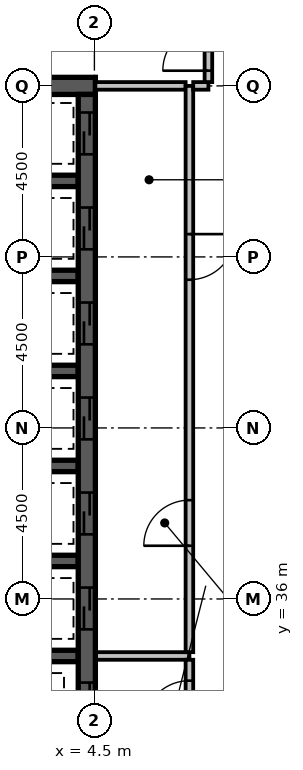
"""IFC4 building model, lengths in metres.
Left out: names, types, materials, properties, quantities, classifications, styles, units other than length and angle.
Written with IfcOpenShell. Run it as: python <this file> out.ifc"""

import sys

from ifc_helpers import new_model, si_unit, direction, frame, frame_2d, origin, place, context, subcontext, project, spatial, rectangle, extrude, element, fill, save


model = new_model("IFC4")
c1 = context("Model", 3, precision=1e-05, world=origin(), true_north=direction((0.0, 1.0)))
c2 = subcontext(c1, "Body", "Model", "MODEL_VIEW")
j1 = project(units=[si_unit("LENGTHUNIT", "METRE"), si_unit("PLANEANGLEUNIT", "RADIAN")], contexts=[c1])
p1 = place(None, origin())
s1 = spatial("IfcSite", under=j1, at=p1, CompositionType="ELEMENT")
p2 = place(p1, origin())
s2 = spatial("IfcBuilding", under=s1, at=p2, CompositionType="ELEMENT")
p3 = place(p2, frame((0.0, 0.0, 251.0)))
s3 = spatial("IfcBuildingStorey", under=s2, at=p3, CompositionType="ELEMENT", Elevation=251.0)
p4 = place(p3, frame((0.275, 49.5, -0.3), z_axis=(0.0, 0.0, 1.0), x_axis=(1.0, 0.0, 0.0)))
e1 = element("IfcWall", 1, at=p4, inside=s3, PredefinedType="SHEAR", context=c2, shape_type="SweptSolid", body=[
    extrude(rectangle(XDim=4.25, YDim=0.45, at=frame_2d((2.125, 0.0))), origin(), (0.0, 0.0, 1.0), 3.6),
])
for number, where, z_axis, x_axis in (
    (2, (0.725, 34.5, -0.3), (0.0, 0.0, 1.0), (1.0, 0.0, 0.0)),
    (3, (0.725, 37.0, -0.3), (0.0, 0.0, 1.0), (1.0, 0.0, 0.0)),
    (4, (0.725, 39.5, -0.3), (0.0, 0.0, 1.0), (1.0, 0.0, 0.0)),
    (5, (0.725, 42.0, -0.3), (0.0, 0.0, 1.0), (1.0, 0.0, 0.0)),
    (6, (0.725, 44.5, -0.3), (0.0, 0.0, 1.0), (1.0, 0.0, 0.0)),
    (7, (0.725, 47.0, -0.3), (0.0, 0.0, 1.0), (1.0, 0.0, 0.0)),
):
    element("IfcWall", number, at=place(p3, frame(where, z_axis=z_axis, x_axis=x_axis)), inside=s3, PredefinedType="SHEAR", context=c2, shape_type="SweptSolid", body=[
        extrude(rectangle(XDim=3.35, YDim=0.3, at=frame_2d((1.675, 0.0))), origin(), (0.0, 0.0, 1.0), 3.6),
    ])
p5 = place(p3, frame((4.3, 27.15, -0.3), z_axis=(0.0, 0.0, 1.0), x_axis=(0.0, 1.0, 0.0)))
e8 = element("IfcWall", 8, at=p5, inside=s3, PredefinedType="SHEAR", context=c2, shape_type="SweptSolid", body=[
    extrude(rectangle(XDim=22.125, YDim=0.45, at=frame_2d((11.062, 0.0))), origin(), (0.0, 0.0, 1.0), 3.6),
])
p6 = place(p5, frame((3.05, 0.0, 0.3)))
e9 = element("IfcOpeningElement", 9, at=p6, cuts=e8, PredefinedType="OPENING", context=c2, shape_type="SweptSolid", body=[
    extrude(rectangle(XDim=1.1, YDim=2.1, at=frame_2d((0.55, 1.05))), frame((0.0, 0.237, 0.0), z_axis=(0.0, -1.0, 0.0), x_axis=(1.0, 0.0, 0.0)), (0.0, 0.0, 1.0), 0.474),
])
p7 = place(p5, frame((0.55, 0.0, 0.3)))
e10 = element("IfcOpeningElement", 10, at=p7, cuts=e8, PredefinedType="OPENING", context=c2, shape_type="SweptSolid", body=[
    extrude(rectangle(XDim=1.1, YDim=2.1, at=frame_2d((0.55, 1.05))), frame((0.0, 0.237, 0.0), z_axis=(0.0, -1.0, 0.0), x_axis=(1.0, 0.0, 0.0)), (0.0, 0.0, 1.0), 0.474),
])
p8 = place(p5, frame((20.55, 0.0, 0.3)))
e11 = element("IfcOpeningElement", 11, at=p8, cuts=e8, PredefinedType="OPENING", context=c2, shape_type="SweptSolid", body=[
    extrude(rectangle(XDim=1.1, YDim=2.1, at=frame_2d((0.55, 1.05))), frame((0.0, 0.237, 0.0), z_axis=(0.0, -1.0, 0.0), x_axis=(1.0, 0.0, 0.0)), (0.0, 0.0, 1.0), 0.474),
])
p9 = place(p5, frame((18.05, 0.0, 0.3)))
e12 = element("IfcOpeningElement", 12, at=p9, cuts=e8, PredefinedType="OPENING", context=c2, shape_type="SweptSolid", body=[
    extrude(rectangle(XDim=1.1, YDim=2.1, at=frame_2d((0.55, 1.05))), frame((0.0, 0.237, 0.0), z_axis=(0.0, -1.0, 0.0), x_axis=(1.0, 0.0, 0.0)), (0.0, 0.0, 1.0), 0.474),
])
p10 = place(p5, frame((15.55, 0.0, 0.3)))
e13 = element("IfcOpeningElement", 13, at=p10, cuts=e8, PredefinedType="OPENING", context=c2, shape_type="SweptSolid", body=[
    extrude(rectangle(XDim=1.1, YDim=2.1, at=frame_2d((0.55, 1.05))), frame((0.0, 0.237, 0.0), z_axis=(0.0, -1.0, 0.0), x_axis=(1.0, 0.0, 0.0)), (0.0, 0.0, 1.0), 0.474),
])
p11 = place(p5, frame((13.05, 0.0, 0.3)))
e14 = element("IfcOpeningElement", 14, at=p11, cuts=e8, PredefinedType="OPENING", context=c2, shape_type="SweptSolid", body=[
    extrude(rectangle(XDim=1.1, YDim=2.1, at=frame_2d((0.55, 1.05))), frame((0.0, 0.237, 0.0), z_axis=(0.0, -1.0, 0.0), x_axis=(1.0, 0.0, 0.0)), (0.0, 0.0, 1.0), 0.474),
])
p12 = place(p5, frame((10.55, 0.0, 0.3)))
e15 = element("IfcOpeningElement", 15, at=p12, cuts=e8, PredefinedType="OPENING", context=c2, shape_type="SweptSolid", body=[
    extrude(rectangle(XDim=1.1, YDim=2.1, at=frame_2d((0.55, 1.05))), frame((0.0, 0.237, 0.0), z_axis=(0.0, -1.0, 0.0), x_axis=(1.0, 0.0, 0.0)), (0.0, 0.0, 1.0), 0.474),
])
p13 = place(p5, frame((8.05, 0.0, 0.3)))
e16 = element("IfcOpeningElement", 16, at=p13, cuts=e8, PredefinedType="OPENING", context=c2, shape_type="SweptSolid", body=[
    extrude(rectangle(XDim=1.1, YDim=2.1, at=frame_2d((0.55, 1.05))), frame((0.0, 0.237, 0.0), z_axis=(0.0, -1.0, 0.0), x_axis=(1.0, 0.0, 0.0)), (0.0, 0.0, 1.0), 0.474),
])
p14 = place(p5, frame((5.55, 0.0, 0.3)))
e17 = element("IfcOpeningElement", 17, at=p14, cuts=e8, PredefinedType="OPENING", context=c2, shape_type="SweptSolid", body=[
    extrude(rectangle(XDim=1.1, YDim=2.1, at=frame_2d((0.55, 1.05))), frame((0.0, 0.237, 0.0), z_axis=(0.0, -1.0, 0.0), x_axis=(1.0, 0.0, 0.0)), (0.0, 0.0, 1.0), 0.474),
])
p15 = place(p3, frame((4.545, 34.5, 0.0), z_axis=(0.0, 0.0, 1.0), x_axis=(1.0, 0.0, 0.0)))
e18 = element("IfcWall", 18, at=p15, inside=s3, PredefinedType="PARTITIONING", context=c2, shape_type="SweptSolid", body=[
    extrude(rectangle(XDim=2.455, YDim=0.2, at=frame_2d((1.228, 0.0))), origin(), (0.0, 0.0, 1.0), 3.3),
])
p16 = place(p3, frame((7.0, 34.6, 0.0), z_axis=(0.0, 0.0, 1.0), x_axis=(0.0, 1.0, 0.0)))
e19 = element("IfcWall", 19, at=p16, inside=s3, PredefinedType="PARTITIONING", context=c2, shape_type="SweptSolid", body=[
    extrude(rectangle(XDim=14.9, YDim=0.2, at=frame_2d((7.45, 0.0))), origin(), (0.0, 0.0, 1.0), 3.3),
])
p17 = place(p16, frame((2.8, 0.0, 0.0)))
e20 = element("IfcOpeningElement", 20, at=p17, cuts=e19, PredefinedType="OPENING", context=c2, shape_type="SweptSolid", body=[
    extrude(rectangle(XDim=1.2, YDim=2.1, at=frame_2d((0.6, 1.05))), frame((0.0, 0.112, 0.0), z_axis=(0.0, -1.0, 0.0), x_axis=(1.0, 0.0, 0.0)), (0.0, 0.0, 1.0), 0.224),
])
p18 = place(p16, frame((9.8, 0.0, 0.0)))
e21 = element("IfcOpeningElement", 21, at=p18, cuts=e19, PredefinedType="OPENING", context=c2, shape_type="SweptSolid", body=[
    extrude(rectangle(XDim=1.2, YDim=2.1, at=frame_2d((0.6, 1.05))), frame((0.0, 0.112, 0.0), z_axis=(0.0, -1.0, 0.0), x_axis=(1.0, 0.0, 0.0)), (0.0, 0.0, 1.0), 0.224),
])
p19 = place(p3, frame((4.525, 49.5, 0.0), z_axis=(0.0, 0.0, 1.0), x_axis=(1.0, 0.0, 0.0)))
e22 = element("IfcWall", 22, at=p19, inside=s3, PredefinedType="PARTITIONING", context=c2, shape_type="SweptSolid", body=[
    extrude(rectangle(XDim=2.375, YDim=0.2, at=frame_2d((1.188, 0.0))), origin(), (0.0, 0.0, 1.0), 3.3),
])
p20 = place(p3, frame((7.0, 32.1, 0.0), z_axis=(0.0, 0.0, 1.0), x_axis=(0.0, 1.0, 0.0)))
e23 = element("IfcWall", 23, at=p20, inside=s3, PredefinedType="PARTITIONING", context=c2, shape_type="SweptSolid", body=[
    extrude(rectangle(XDim=2.3, YDim=0.2, at=frame_2d((1.15, 0.0))), origin(), (0.0, 0.0, 1.0), 3.3),
])
p21 = place(p20, frame((0.55, 0.0, 0.0)))
e24 = element("IfcOpeningElement", 24, at=p21, cuts=e23, PredefinedType="OPENING", context=c2, shape_type="SweptSolid", body=[
    extrude(rectangle(XDim=1.2, YDim=2.1, at=frame_2d((0.6, 1.05))), frame((0.0, 0.112, 0.0), z_axis=(0.0, -1.0, 0.0), x_axis=(1.0, 0.0, 0.0)), (0.0, 0.0, 1.0), 0.224),
])
p22 = place(p3, frame((7.1, 49.5, 0.0), z_axis=(0.0, 0.0, 1.0), x_axis=(1.0, 0.0, 0.0)))
e25 = element("IfcWall", 25, at=p22, inside=s3, PredefinedType="PARTITIONING", context=c2, shape_type="SweptSolid", body=[
    extrude(rectangle(XDim=0.4, YDim=0.2, at=frame_2d((0.2, 0.0))), origin(), (0.0, 0.0, 1.0), 3.3),
])
p23 = place(p3, frame((7.5, 49.6, 0.0), z_axis=(0.0, 0.0, 1.0), x_axis=(0.0, 1.0, 0.0)))
e26 = element("IfcWall", 26, at=p23, inside=s3, PredefinedType="PARTITIONING", context=c2, shape_type="SweptSolid", body=[
    extrude(rectangle(XDim=3.9, YDim=0.2, at=frame_2d((1.95, 0.0))), origin(), (0.0, 0.0, 1.0), 3.3),
])
p24 = place(p23, frame((0.3, 0.0, 0.0)))
e27 = element("IfcOpeningElement", 27, at=p24, cuts=e26, PredefinedType="OPENING", context=c2, shape_type="SweptSolid", body=[
    extrude(rectangle(XDim=1.2, YDim=2.1, at=frame_2d((0.6, 1.05))), frame((0.0, 0.112, 0.0), z_axis=(0.0, -1.0, 0.0), x_axis=(1.0, 0.0, 0.0)), (0.0, 0.0, 1.0), 0.224),
])
p25 = place(p24, origin())
e28 = element("IfcDoor", 28, at=p25, inside=s3, OperationType="SINGLE_SWING_LEFT", PredefinedType="DOOR", context=c2, shape_type="SweptSolid", body=[
    extrude(rectangle(XDim=1.2, YDim=2.1, at=frame_2d((0.6, 1.05))), frame((0.0, 0.025, 0.0), z_axis=(0.0, -1.0, 0.0), x_axis=(1.0, 0.0, 0.0)), (0.0, 0.0, 1.0), 0.05),
])
fill(e27, e28)
p26 = place(p8, origin())
e29 = element("IfcDoor", 29, at=p26, inside=s3, OperationType="SLIDING_TO_LEFT", PredefinedType="DOOR", context=c2, shape_type="SweptSolid", body=[
    extrude(rectangle(XDim=1.1, YDim=2.1, at=frame_2d((0.55, 1.05))), frame((0.0, 0.025, 0.0), z_axis=(0.0, -1.0, 0.0), x_axis=(1.0, 0.0, 0.0)), (0.0, 0.0, 1.0), 0.05),
])
fill(e11, e29)
p27 = place(p9, origin())
e30 = element("IfcDoor", 30, at=p27, inside=s3, OperationType="SLIDING_TO_LEFT", PredefinedType="DOOR", context=c2, shape_type="SweptSolid", body=[
    extrude(rectangle(XDim=1.1, YDim=2.1, at=frame_2d((0.55, 1.05))), frame((0.0, 0.025, 0.0), z_axis=(0.0, -1.0, 0.0), x_axis=(1.0, 0.0, 0.0)), (0.0, 0.0, 1.0), 0.05),
])
fill(e12, e30)
p28 = place(p10, origin())
e31 = element("IfcDoor", 31, at=p28, inside=s3, OperationType="SLIDING_TO_LEFT", PredefinedType="DOOR", context=c2, shape_type="SweptSolid", body=[
    extrude(rectangle(XDim=1.1, YDim=2.1, at=frame_2d((0.55, 1.05))), frame((0.0, 0.025, 0.0), z_axis=(0.0, -1.0, 0.0), x_axis=(1.0, 0.0, 0.0)), (0.0, 0.0, 1.0), 0.05),
])
fill(e13, e31)
p29 = place(p11, origin())
e32 = element("IfcDoor", 32, at=p29, inside=s3, OperationType="SLIDING_TO_LEFT", PredefinedType="DOOR", context=c2, shape_type="SweptSolid", body=[
    extrude(rectangle(XDim=1.1, YDim=2.1, at=frame_2d((0.55, 1.05))), frame((0.0, 0.025, 0.0), z_axis=(0.0, -1.0, 0.0), x_axis=(1.0, 0.0, 0.0)), (0.0, 0.0, 1.0), 0.05),
])
fill(e14, e32)
p30 = place(p12, origin())
e33 = element("IfcDoor", 33, at=p30, inside=s3, OperationType="SLIDING_TO_LEFT", PredefinedType="DOOR", context=c2, shape_type="SweptSolid", body=[
    extrude(rectangle(XDim=1.1, YDim=2.1, at=frame_2d((0.55, 1.05))), frame((0.0, 0.025, 0.0), z_axis=(0.0, -1.0, 0.0), x_axis=(1.0, 0.0, 0.0)), (0.0, 0.0, 1.0), 0.05),
])
fill(e15, e33)
p31 = place(p13, origin())
e34 = element("IfcDoor", 34, at=p31, inside=s3, OperationType="SLIDING_TO_LEFT", PredefinedType="DOOR", context=c2, shape_type="SweptSolid", body=[
    extrude(rectangle(XDim=1.1, YDim=2.1, at=frame_2d((0.55, 1.05))), frame((0.0, 0.025, 0.0), z_axis=(0.0, -1.0, 0.0), x_axis=(1.0, 0.0, 0.0)), (0.0, 0.0, 1.0), 0.05),
])
fill(e16, e34)
p32 = place(p17, origin())
e35 = element("IfcDoor", 35, at=p32, inside=s3, OperationType="SINGLE_SWING_LEFT", PredefinedType="DOOR", context=c2, shape_type="SweptSolid", body=[
    extrude(rectangle(XDim=1.2, YDim=2.1, at=frame_2d((0.6, 1.05))), frame((0.0, 0.025, 0.0), z_axis=(0.0, -1.0, 0.0), x_axis=(1.0, 0.0, 0.0)), (0.0, 0.0, 1.0), 0.05),
])
fill(e20, e35)
p33 = place(p18, origin())
e36 = element("IfcDoor", 36, at=p33, inside=s3, OperationType="SINGLE_SWING_RIGHT", PredefinedType="DOOR", context=c2, shape_type="SweptSolid", body=[
    extrude(rectangle(XDim=1.2, YDim=2.1, at=frame_2d((0.6, 1.05))), frame((0.0, 0.025, 0.0), z_axis=(0.0, -1.0, 0.0), x_axis=(1.0, 0.0, 0.0)), (0.0, 0.0, 1.0), 0.05),
])
fill(e21, e36)
p34 = place(p21, origin())
e37 = element("IfcDoor", 37, at=p34, inside=s3, OperationType="SINGLE_SWING_LEFT", PredefinedType="DOOR", context=c2, shape_type="SweptSolid", body=[
    extrude(rectangle(XDim=1.2, YDim=2.1, at=frame_2d((0.6, 1.05))), frame((0.0, 0.025, 0.0), z_axis=(0.0, -1.0, 0.0), x_axis=(1.0, 0.0, 0.0)), (0.0, 0.0, 1.0), 0.05),
])
fill(e24, e37)
p35 = place(p14, origin())
e38 = element("IfcDoor", 38, at=p35, inside=s3, OperationType="SLIDING_TO_LEFT", PredefinedType="DOOR", context=c2, shape_type="SweptSolid", body=[
    extrude(rectangle(XDim=1.1, YDim=2.1, at=frame_2d((0.55, 1.05))), frame((0.0, 0.025, 0.0), z_axis=(0.0, -1.0, 0.0), x_axis=(1.0, 0.0, 0.0)), (0.0, 0.0, 1.0), 0.05),
])
fill(e17, e38)
save(model, sys.argv[1])
